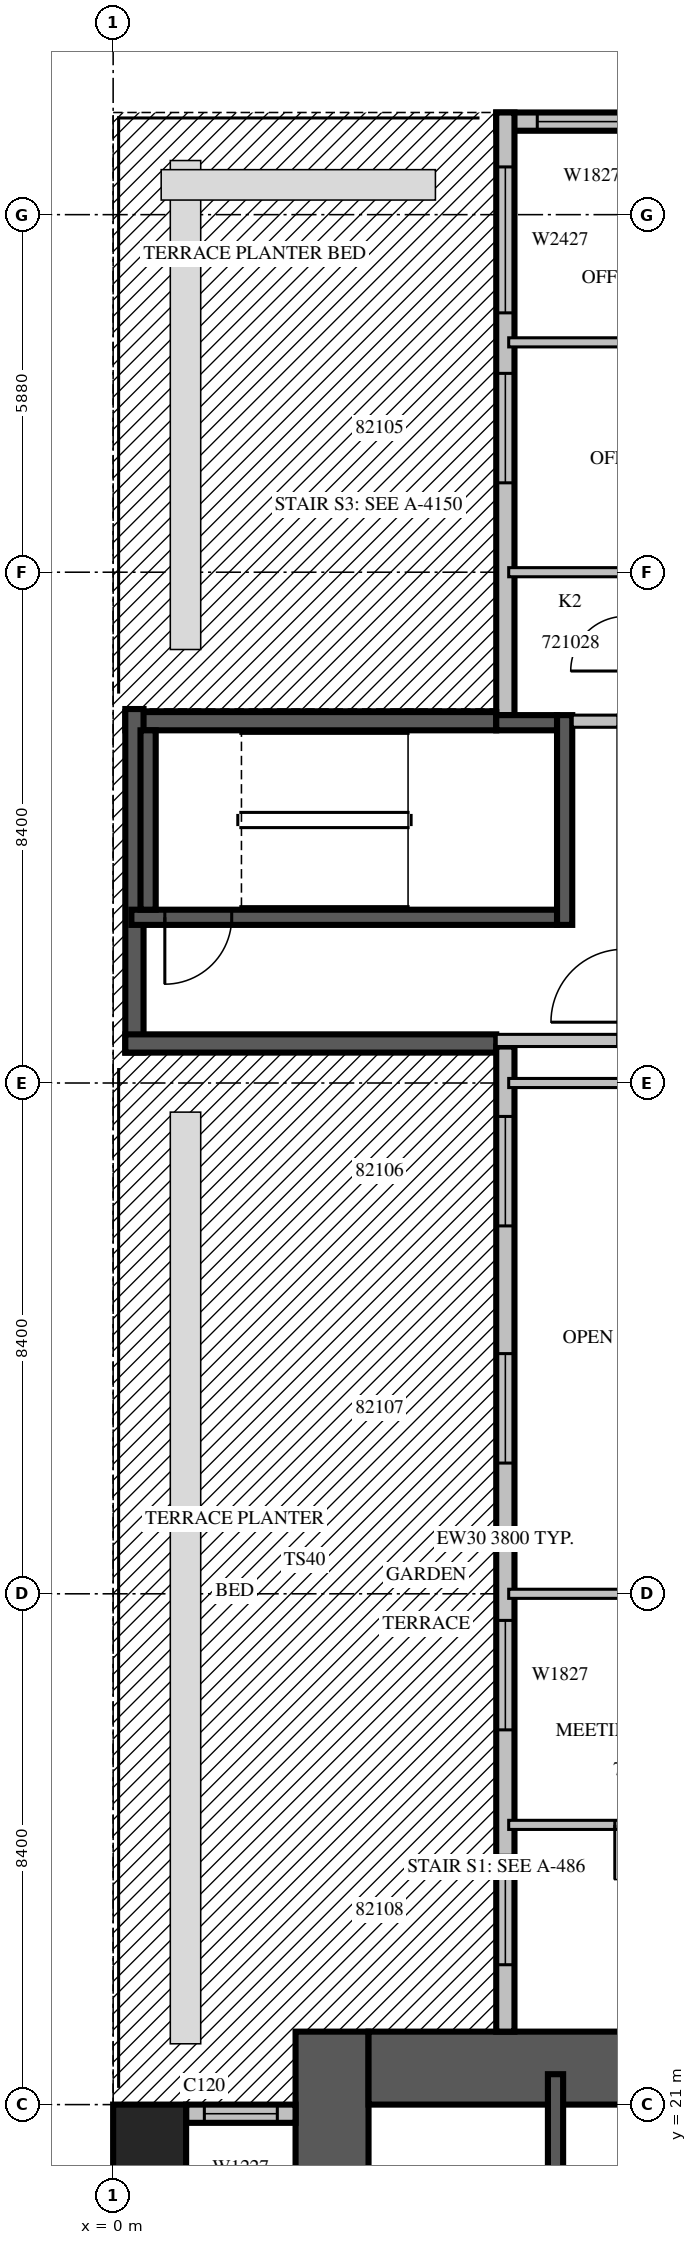
"""IFC4 building model, lengths in metres.
Left out: names, types, materials, properties, quantities, classifications, styles, units other than length and angle.
Written with IfcOpenShell. Run it as: python <this file> out.ifc"""

import sys

from ifc_helpers import new_model, si_unit, direction, frame, frame_2d, origin, origin_2d, place, context, subcontext, project, spatial, rectangle, extrude, source, transform, mapped, element, fill, save


model = new_model("IFC4")
c1 = context("Model", 3, precision=1e-05, world=origin(), true_north=direction((0.0, 1.0)))
c2 = subcontext(c1, "Body", "Model", "MODEL_VIEW")
j1 = project(units=[si_unit("LENGTHUNIT", "METRE"), si_unit("PLANEANGLEUNIT", "RADIAN")], contexts=[c1])
p1 = place(None, origin())
s1 = spatial("IfcSite", under=j1, at=p1, CompositionType="ELEMENT")
p2 = place(p1, origin())
s2 = spatial("IfcBuilding", under=s1, at=p2, CompositionType="ELEMENT")
p3 = place(p2, frame((0.0, 0.0, 99.3)))
s3 = spatial("IfcBuildingStorey", under=s2, at=p3, CompositionType="ELEMENT", Elevation=99.3)
m1 = source(origin(), c2, "Body", "SweptSolid", [
    extrude(rectangle(XDim=1.2, YDim=1.2, at=origin_2d()), origin(), (0.0, 0.0, 1.0), 4.2),
])
p4 = place(p3, frame((0.6, 20.4, 0.0), z_axis=(0.0, 0.0, 1.0), x_axis=(1.0, 0.0, 0.0)))
e1 = element("IfcColumn", 1, at=p4, inside=s3, PredefinedType="COLUMN", context=c2, shape_type="MappedRepresentation", body=[
    mapped(m1, transform((0.0, 0.0, 0.0), scale=1.0)),
])
m2 = source(origin(), c2, "Body", "SweptSolid", [
    extrude(rectangle(XDim=18.0, YDim=1.2, at=frame_2d((9.0, 0.0))), origin(), (0.0, 0.0, 1.0), 4.2),
])
p5 = place(p3, frame((3.6, 4.2, 0.0), z_axis=(0.0, 0.0, 1.0), x_axis=(0.0, 1.0, 0.0)))
e2 = element("IfcWall", 2, at=p5, inside=s3, PredefinedType="SHEAR", context=c2, shape_type="MappedRepresentation", body=[
    mapped(m2, transform((0.0, 0.0, 0.0), scale=1.0)),
])
m3 = source(origin(), c2, "Body", "SweptSolid", [
    extrude(rectangle(XDim=2.2, YDim=2.1, at=frame_2d((1.1, 1.05))), frame((0.0, 0.61, 0.0), z_axis=(0.0, -1.0, 0.0), x_axis=(1.0, 0.0, 0.0)), (0.0, 0.0, 1.0), 1.22),
])
p6 = place(p5, frame((4.2, 0.0, 0.0)))
e3 = element("IfcOpeningElement", 3, at=p6, cuts=e2, PredefinedType="OPENING", context=c2, shape_type="MappedRepresentation", body=[
    mapped(m3, transform((0.0, 0.0, 0.0), scale=1.0)),
])
p7 = place(p5, frame((10.95, 0.0, 0.0)))
e4 = element("IfcOpeningElement", 4, at=p7, cuts=e2, PredefinedType="OPENING", context=c2, shape_type="SweptSolid", body=[
    extrude(rectangle(XDim=0.9, YDim=2.1, at=frame_2d((0.45, 1.05))), frame((0.0, 0.61, 0.0), z_axis=(0.0, -1.0, 0.0), x_axis=(1.0, 0.0, 0.0)), (0.0, 0.0, 1.0), 1.22),
])
m4 = source(origin(), c2, "Body", "SweptSolid", [
    extrude(rectangle(XDim=16.8, YDim=1.2, at=frame_2d((8.4, 0.0))), origin(), (0.0, 0.0, 1.0), 4.2),
])
p8 = place(p3, frame((4.2, 21.6, 0.0), z_axis=(0.0, 0.0, 1.0), x_axis=(1.0, 0.0, 0.0)))
e5 = element("IfcWall", 5, at=p8, inside=s3, PredefinedType="SHEAR", context=c2, shape_type="MappedRepresentation", body=[
    mapped(m4, transform((0.0, 0.0, 0.0), scale=1.0)),
])
m5 = source(origin(), c2, "Body", "SweptSolid", [
    extrude(rectangle(XDim=1.2, YDim=2.1, at=frame_2d((0.6, 1.05))), frame((0.0, 0.61, 0.0), z_axis=(0.0, -1.0, 0.0), x_axis=(1.0, 0.0, 0.0)), (0.0, 0.0, 1.0), 1.22),
])
p9 = place(p8, frame((6.2, 0.0, 0.0)))
e6 = element("IfcOpeningElement", 6, at=p9, cuts=e5, PredefinedType="OPENING", context=c2, shape_type="MappedRepresentation", body=[
    mapped(m5, transform((0.0, 0.0, 0.0), scale=1.0)),
])
p10 = place(p3, frame((16.8, 53.61, 0.0), z_axis=(0.0, 0.0, 1.0), x_axis=(-1.0, 0.0, 0.0)))
e7 = element("IfcWall", 7, at=p10, inside=s3, PredefinedType="STANDARD", context=c2, shape_type="SweptSolid", body=[
    extrude(rectangle(XDim=10.5, YDim=0.3, at=frame_2d((5.25, 0.0))), origin(), (0.0, 0.0, 1.0), 3.8),
])
m6 = source(origin(), c2, "Body", "SweptSolid", [
    extrude(rectangle(XDim=1.8, YDim=2.4, at=frame_2d((0.9, 1.2))), frame((0.0, 0.16, 0.0), z_axis=(0.0, -1.0, 0.0), x_axis=(1.0, 0.0, 0.0)), (0.0, 0.0, 1.0), 0.32),
])
p11 = place(p10, frame((1.95, 0.0, 0.0)))
e8 = element("IfcOpeningElement", 8, at=p11, cuts=e7, PredefinedType="OPENING", context=c2, shape_type="MappedRepresentation", body=[
    mapped(m6, transform((0.0, 0.0, 0.0), scale=1.0)),
])
m7 = source(origin(), c2, "Body", "SweptSolid", [
    extrude(rectangle(XDim=1.8, YDim=2.7, at=frame_2d((0.9, 1.35))), frame((0.0, 0.16, 0.0), z_axis=(0.0, -1.0, 0.0), x_axis=(1.0, 0.0, 0.0)), (0.0, 0.0, 1.0), 0.32),
])
p12 = place(p10, frame((8.025, 0.0, 0.6)))
e9 = element("IfcOpeningElement", 9, at=p12, cuts=e7, PredefinedType="OPENING", context=c2, shape_type="MappedRepresentation", body=[
    mapped(m7, transform((0.0, 0.0, 0.0), scale=1.0)),
])
p13 = place(p3, frame((6.45, 53.76, 0.0), z_axis=(0.0, 0.0, 1.0), x_axis=(0.0, -1.0, 0.0)))
e10 = element("IfcWall", 10, at=p13, inside=s3, PredefinedType="STANDARD", context=c2, shape_type="SweptSolid", body=[
    extrude(rectangle(XDim=9.91, YDim=0.3, at=frame_2d((4.955, 0.0))), origin(), (0.0, 0.0, 1.0), 3.8),
])
p14 = place(p13, frame((4.29, 0.0, 0.0)))
e11 = element("IfcOpeningElement", 11, at=p14, cuts=e10, PredefinedType="OPENING", context=c2, shape_type="MappedRepresentation", body=[
    mapped(m6, transform((0.0, 0.0, 0.0), scale=1.0)),
])
m8 = source(origin(), c2, "Body", "SweptSolid", [
    extrude(rectangle(XDim=2.4, YDim=2.7, at=frame_2d((1.2, 1.35))), frame((0.0, 0.16, 0.0), z_axis=(0.0, -1.0, 0.0), x_axis=(1.0, 0.0, 0.0)), (0.0, 0.0, 1.0), 0.32),
])
p15 = place(p13, frame((0.895, 0.0, 0.6)))
e12 = element("IfcOpeningElement", 12, at=p15, cuts=e10, PredefinedType="OPENING", context=c2, shape_type="MappedRepresentation", body=[
    mapped(m8, transform((0.0, 0.0, 0.0), scale=1.0)),
])
p16 = place(p3, frame((6.3, 43.75, 0.0), z_axis=(0.0, 0.0, 1.0), x_axis=(-1.0, 0.0, 0.0)))
e13 = element("IfcWall", 13, at=p16, inside=s3, PredefinedType="SOLIDWALL", context=c2, shape_type="SweptSolid", body=[
    extrude(rectangle(XDim=6.1, YDim=0.3, at=frame_2d((3.05, 0.0))), origin(), (0.0, 0.0, 1.0), 3.8),
])
p17 = place(p3, frame((0.35, 43.95, 0.0), z_axis=(0.0, 0.0, 1.0), x_axis=(0.0, -1.0, 0.0)))
e14 = element("IfcWall", 14, at=p17, inside=s3, PredefinedType="SOLIDWALL", context=c2, shape_type="SweptSolid", body=[
    extrude(rectangle(XDim=5.65, YDim=0.3, at=frame_2d((2.825, 0.0))), origin(), (0.0, 0.0, 1.0), 3.8),
])
m9 = source(origin(), c2, "Body", "SweptSolid", [
    extrude(rectangle(XDim=6.1, YDim=0.3, at=frame_2d((3.05, 0.0))), origin(), (0.0, 0.0, 1.0), 3.8),
])
p18 = place(p3, frame((0.2, 38.45, 0.0), z_axis=(0.0, 0.0, 1.0), x_axis=(1.0, 0.0, 0.0)))
e15 = element("IfcWall", 15, at=p18, inside=s3, PredefinedType="SOLIDWALL", context=c2, shape_type="MappedRepresentation", body=[
    mapped(m9, transform((0.0, 0.0, 0.0), scale=1.0)),
])
p19 = place(p3, frame((6.45, 38.4, 0.0), z_axis=(0.0, 0.0, 1.0), x_axis=(0.0, -1.0, 0.0)))
e16 = element("IfcWall", 16, at=p19, inside=s3, PredefinedType="STANDARD", context=c2, shape_type="SweptSolid", body=[
    extrude(rectangle(XDim=16.2, YDim=0.3, at=frame_2d((8.1, 0.0))), origin(), (0.0, 0.0, 1.0), 3.8),
])
p20 = place(p19, frame((1.15, 0.0, 0.0)))
e17 = element("IfcOpeningElement", 17, at=p20, cuts=e16, PredefinedType="OPENING", context=c2, shape_type="MappedRepresentation", body=[
    mapped(m6, transform((0.0, 0.0, 0.0), scale=1.0)),
])
p21 = place(p19, frame((5.05, 0.0, 0.0)))
e18 = element("IfcOpeningElement", 18, at=p21, cuts=e16, PredefinedType="OPENING", context=c2, shape_type="MappedRepresentation", body=[
    mapped(m6, transform((0.0, 0.0, 0.0), scale=1.0)),
])
p22 = place(p19, frame((9.438, 0.0, 0.6)))
e19 = element("IfcOpeningElement", 19, at=p22, cuts=e16, PredefinedType="OPENING", context=c2, shape_type="MappedRepresentation", body=[
    mapped(m7, transform((0.0, 0.0, 0.0), scale=1.0)),
])
p23 = place(p19, frame((13.3, 0.0, 0.0)))
e20 = element("IfcOpeningElement", 20, at=p23, cuts=e16, PredefinedType="OPENING", context=c2, shape_type="MappedRepresentation", body=[
    mapped(m6, transform((0.0, 0.0, 0.0), scale=1.0)),
])
m10 = source(origin(), c2, "Body", "SweptSolid", [
    extrude(rectangle(XDim=1.8, YDim=0.3, at=frame_2d((0.9, 0.0))), origin(), (0.0, 0.0, 1.0), 3.8),
])
p24 = place(p3, frame((3.0, 20.85, 0.0), z_axis=(0.0, 0.0, 1.0), x_axis=(-1.0, 0.0, 0.0)))
e21 = element("IfcWall", 21, at=p24, inside=s3, PredefinedType="STANDARD", context=c2, shape_type="MappedRepresentation", body=[
    mapped(m10, transform((0.0, 0.0, 0.0), scale=1.0)),
])
m11 = source(origin(), c2, "Body", "SweptSolid", [
    extrude(rectangle(XDim=1.2, YDim=2.7, at=frame_2d((0.6, 1.35))), frame((0.0, 0.16, 0.0), z_axis=(0.0, -1.0, 0.0), x_axis=(1.0, 0.0, 0.0)), (0.0, 0.0, 1.0), 0.32),
])
p25 = place(p24, frame((0.3, 0.0, 0.6)))
e22 = element("IfcOpeningElement", 22, at=p25, cuts=e21, PredefinedType="OPENING", context=c2, shape_type="MappedRepresentation", body=[
    mapped(m11, transform((0.0, 0.0, 0.0), scale=1.0)),
])
m12 = source(origin(), c2, "Body", "SweptSolid", [
    extrude(rectangle(XDim=6.6, YDim=0.25, at=frame_2d((3.3, 0.0))), origin(), (0.0, 0.0, 1.0), 3.8),
])
p26 = place(p3, frame((7.275, 14.9, 0.0), z_axis=(0.0, 0.0, 1.0), x_axis=(0.0, 1.0, 0.0)))
e23 = element("IfcWall", 23, at=p26, inside=s3, PredefinedType="SOLIDWALL", context=c2, shape_type="MappedRepresentation", body=[
    mapped(m12, transform((0.0, 0.0, 0.0), scale=1.0)),
])
m13 = source(origin(), c2, "Body", "SweptSolid", [
    extrude(rectangle(XDim=1.1, YDim=2.1, at=frame_2d((0.55, 1.05))), frame((0.0, 0.135, 0.0), z_axis=(0.0, -1.0, 0.0), x_axis=(1.0, 0.0, 0.0)), (0.0, 0.0, 1.0), 0.27),
])
p27 = place(p26, frame((0.15, 0.0, 0.0)))
e24 = element("IfcOpeningElement", 24, at=p27, cuts=e23, PredefinedType="OPENING", context=c2, shape_type="MappedRepresentation", body=[
    mapped(m13, transform((0.0, 0.0, 0.0), scale=1.0)),
])
m14 = source(origin(), c2, "Body", "SweptSolid", [
    extrude(rectangle(XDim=7.0, YDim=0.25, at=frame_2d((3.5, 0.0))), origin(), (0.0, 0.0, 1.0), 3.8),
])
p28 = place(p3, frame((0.3, 40.525, 0.0), z_axis=(0.0, 0.0, 1.0), x_axis=(1.0, 0.0, 0.0)))
e25 = element("IfcWall", 25, at=p28, inside=s3, PredefinedType="SOLIDWALL", context=c2, shape_type="MappedRepresentation", body=[
    mapped(m14, transform((0.0, 0.0, 0.0), scale=1.0)),
])
p29 = place(p28, frame((0.55, 0.0, 0.0)))
e26 = element("IfcOpeningElement", 26, at=p29, cuts=e25, PredefinedType="OPENING", context=c2, shape_type="MappedRepresentation", body=[
    mapped(m13, transform((0.0, 0.0, 0.0), scale=1.0)),
])
p30 = place(p3, frame((6.3, 43.725, 0.0), z_axis=(0.0, 0.0, 1.0), x_axis=(1.0, 0.0, 0.0)))
e27 = element("IfcWall", 27, at=p30, inside=s3, PredefinedType="SOLIDWALL", context=c2, shape_type="SweptSolid", body=[
    extrude(rectangle(XDim=1.0, YDim=0.25, at=frame_2d((0.5, 0.0))), origin(), (0.0, 0.0, 1.0), 3.8),
])
m15 = source(origin(), c2, "Body", "SweptSolid", [
    extrude(rectangle(XDim=3.45, YDim=0.25, at=frame_2d((1.725, 0.0))), origin(), (0.0, 0.0, 1.0), 3.8),
])
p31 = place(p3, frame((7.425, 40.4, 0.0), z_axis=(0.0, 0.0, 1.0), x_axis=(0.0, 1.0, 0.0)))
e28 = element("IfcWall", 28, at=p31, inside=s3, PredefinedType="SOLIDWALL", context=c2, shape_type="MappedRepresentation", body=[
    mapped(m15, transform((0.0, 0.0, 0.0), scale=1.0)),
])
m16 = source(origin(), c2, "Body", "SweptSolid", [
    extrude(rectangle(XDim=2.95, YDim=0.25, at=frame_2d((1.475, 0.0))), origin(), (0.0, 0.0, 1.0), 3.8),
])
p32 = place(p3, frame((0.575, 40.65, 0.0), z_axis=(0.0, 0.0, 1.0), x_axis=(0.0, 1.0, 0.0)))
e29 = element("IfcWall", 29, at=p32, inside=s3, PredefinedType="SOLIDWALL", context=c2, shape_type="MappedRepresentation", body=[
    mapped(m16, transform((0.0, 0.0, 0.0), scale=1.0)),
])
p33 = place(p3, frame((6.3, 38.5, 0.0), z_axis=(0.0, 0.0, 1.0), x_axis=(1.0, 0.0, 0.0)))
e30 = element("IfcWall", 30, at=p33, inside=s3, PredefinedType="PARTITIONING", context=c2, shape_type="SweptSolid", body=[
    extrude(rectangle(XDim=2.0, YDim=0.2, at=frame_2d((1.0, 0.0))), origin(), (0.0, 0.0, 1.0), 3.8),
])
m17 = source(origin(), c2, "Body", "SweptSolid", [
    extrude(rectangle(XDim=0.75, YDim=0.2, at=frame_2d((0.375, 0.0))), origin(), (0.0, 0.0, 1.0), 3.8),
])
p34 = place(p3, frame((7.55, 43.75, 0.0), z_axis=(0.0, 0.0, 1.0), x_axis=(1.0, 0.0, 0.0)))
e31 = element("IfcWall", 31, at=p34, inside=s3, PredefinedType="PARTITIONING", context=c2, shape_type="MappedRepresentation", body=[
    mapped(m17, transform((0.0, 0.0, 0.0), scale=1.0)),
])
p35 = place(p3, frame((6.505, 25.6, 0.0), z_axis=(0.0, 0.0, 1.0), x_axis=(1.0, 0.0, 0.0)))
e32 = element("IfcWall", 32, at=p35, inside=s3, PredefinedType="PARTITIONING", context=c2, shape_type="SweptSolid", body=[
    extrude(rectangle(XDim=8.495, YDim=0.15, at=frame_2d((4.247, 0.0))), origin(), (0.0, 0.0, 1.0), 3.8),
])
m18 = source(origin(), c2, "Body", "SweptSolid", [
    extrude(rectangle(XDim=0.9, YDim=2.1, at=frame_2d((0.45, 1.05))), frame((0.0, 0.085, 0.0), z_axis=(0.0, -1.0, 0.0), x_axis=(1.0, 0.0, 0.0)), (0.0, 0.0, 1.0), 0.17),
])
p36 = place(p35, frame((1.745, 0.0, 0.0)))
e33 = element("IfcOpeningElement", 33, at=p36, cuts=e32, PredefinedType="OPENING", context=c2, shape_type="MappedRepresentation", body=[
    mapped(m18, transform((0.0, 0.0, 0.0), scale=1.0)),
])
p37 = place(p35, frame((6.82, 0.0, 0.0)))
e34 = element("IfcOpeningElement", 34, at=p37, cuts=e32, PredefinedType="OPENING", context=c2, shape_type="MappedRepresentation", body=[
    mapped(m18, transform((0.0, 0.0, 0.0), scale=1.0)),
])
p38 = place(p3, frame((9.901, 29.4, 0.0), z_axis=(0.0, 0.0, 1.0), x_axis=(-1.0, 0.0, 0.0)))
e35 = element("IfcWall", 35, at=p38, inside=s3, PredefinedType="PARTITIONING", context=c2, shape_type="SweptSolid", body=[
    extrude(rectangle(XDim=3.396, YDim=0.15, at=frame_2d((1.698, 0.0))), origin(), (0.0, 0.0, 1.0), 3.8),
])
m19 = source(origin(), c2, "Body", "SweptSolid", [
    extrude(rectangle(XDim=3.396, YDim=0.15, at=frame_2d((1.698, 0.0))), origin(), (0.0, 0.0, 1.0), 3.8),
])
p39 = place(p3, frame((9.901, 37.8, 0.0), z_axis=(0.0, 0.0, 1.0), x_axis=(-1.0, 0.0, 0.0)))
e36 = element("IfcWall", 36, at=p39, inside=s3, PredefinedType="PARTITIONING", context=c2, shape_type="MappedRepresentation", body=[
    mapped(m19, transform((0.0, 0.0, 0.0), scale=1.0)),
])
p40 = place(p3, frame((11.1, 49.98, 0.0), z_axis=(0.0, 0.0, 1.0), x_axis=(-1.0, 0.0, 0.0)))
e37 = element("IfcWall", 37, at=p40, inside=s3, PredefinedType="PARTITIONING", context=c2, shape_type="SweptSolid", body=[
    extrude(rectangle(XDim=4.595, YDim=0.15, at=frame_2d((2.297, 0.0))), origin(), (0.0, 0.0, 1.0), 3.8),
])
p41 = place(p3, frame((9.901, 46.2, 0.0), z_axis=(0.0, 0.0, 1.0), x_axis=(-1.0, 0.0, 0.0)))
e38 = element("IfcWall", 38, at=p41, inside=s3, PredefinedType="PARTITIONING", context=c2, shape_type="MappedRepresentation", body=[
    mapped(m19, transform((0.0, 0.0, 0.0), scale=1.0)),
])
m20 = source(origin(), c2, "Body", "SweptSolid", [
    extrude(rectangle(XDim=1.8, YDim=2.7, at=frame_2d((0.9, 1.35))), frame((0.0, 0.03, 0.0), z_axis=(0.0, -1.0, 0.0), x_axis=(1.0, 0.0, 0.0)), (0.0, 0.0, 1.0), 0.06),
])
p42 = place(p12, origin())
e39 = element("IfcWindow", 39, at=p42, inside=s3, PartitioningType="SINGLE_PANEL", PredefinedType="WINDOW", context=c2, shape_type="MappedRepresentation", body=[
    mapped(m20, transform((0.0, 0.0, 0.0), scale=1.0)),
])
fill(e9, e39)
m21 = source(origin(), c2, "Body", "SweptSolid", [
    extrude(rectangle(XDim=1.8, YDim=2.4, at=frame_2d((0.9, 1.2))), frame((0.0, 0.025, 0.0), z_axis=(0.0, -1.0, 0.0), x_axis=(1.0, 0.0, 0.0)), (0.0, 0.0, 1.0), 0.05),
])
p43 = place(p14, origin())
e40 = element("IfcDoor", 40, at=p43, inside=s3, OperationType="SLIDING_TO_LEFT", PredefinedType="DOOR", context=c2, shape_type="MappedRepresentation", body=[
    mapped(m21, transform((0.0, 0.0, 0.0), scale=1.0)),
])
fill(e11, e40)
m22 = source(origin(), c2, "Body", "SweptSolid", [
    extrude(rectangle(XDim=2.4, YDim=2.7, at=frame_2d((1.2, 1.35))), frame((0.0, 0.03, 0.0), z_axis=(0.0, -1.0, 0.0), x_axis=(1.0, 0.0, 0.0)), (0.0, 0.0, 1.0), 0.06),
])
p44 = place(p15, origin())
e41 = element("IfcWindow", 41, at=p44, inside=s3, PartitioningType="SINGLE_PANEL", PredefinedType="WINDOW", context=c2, shape_type="MappedRepresentation", body=[
    mapped(m22, transform((0.0, 0.0, 0.0), scale=1.0)),
])
fill(e12, e41)
p45 = place(p20, origin())
e42 = element("IfcDoor", 42, at=p45, inside=s3, OperationType="SLIDING_TO_LEFT", PredefinedType="DOOR", context=c2, shape_type="MappedRepresentation", body=[
    mapped(m21, transform((0.0, 0.0, 0.0), scale=1.0)),
])
fill(e17, e42)
p46 = place(p21, origin())
e43 = element("IfcDoor", 43, at=p46, inside=s3, OperationType="SLIDING_TO_LEFT", PredefinedType="DOOR", context=c2, shape_type="MappedRepresentation", body=[
    mapped(m21, transform((0.0, 0.0, 0.0), scale=1.0)),
])
fill(e18, e43)
p47 = place(p22, origin())
e44 = element("IfcWindow", 44, at=p47, inside=s3, PartitioningType="SINGLE_PANEL", PredefinedType="WINDOW", context=c2, shape_type="MappedRepresentation", body=[
    mapped(m20, transform((0.0, 0.0, 0.0), scale=1.0)),
])
fill(e19, e44)
p48 = place(p23, origin())
e45 = element("IfcDoor", 45, at=p48, inside=s3, OperationType="SLIDING_TO_LEFT", PredefinedType="DOOR", context=c2, shape_type="MappedRepresentation", body=[
    mapped(m21, transform((0.0, 0.0, 0.0), scale=1.0)),
])
fill(e20, e45)
m23 = source(origin(), c2, "Body", "SweptSolid", [
    extrude(rectangle(XDim=1.2, YDim=2.7, at=frame_2d((0.6, 1.35))), frame((0.0, 0.03, 0.0), z_axis=(0.0, -1.0, 0.0), x_axis=(1.0, 0.0, 0.0)), (0.0, 0.0, 1.0), 0.06),
])
p49 = place(p25, origin())
e46 = element("IfcWindow", 46, at=p49, inside=s3, PartitioningType="SINGLE_PANEL", PredefinedType="WINDOW", context=c2, shape_type="MappedRepresentation", body=[
    mapped(m23, transform((0.0, 0.0, 0.0), scale=1.0)),
])
fill(e22, e46)
m24 = source(origin(), c2, "Body", "SweptSolid", [
    extrude(rectangle(XDim=1.1, YDim=2.1, at=frame_2d((0.55, 1.05))), frame((0.0, 0.025, 0.0), z_axis=(0.0, -1.0, 0.0), x_axis=(1.0, 0.0, 0.0)), (0.0, 0.0, 1.0), 0.05),
])
p50 = place(p29, origin())
e47 = element("IfcDoor", 47, at=p50, inside=s3, OperationType="SINGLE_SWING_RIGHT", PredefinedType="DOOR", context=c2, shape_type="MappedRepresentation", body=[
    mapped(m24, transform((0.0, 0.0, 0.0), scale=1.0)),
])
fill(e26, e47)
m25 = source(origin(), c2, "Body", "SweptSolid", [
    extrude(rectangle(XDim=0.9, YDim=2.1, at=frame_2d((0.45, 1.05))), frame((0.0, 0.025, 0.0), z_axis=(0.0, -1.0, 0.0), x_axis=(1.0, 0.0, 0.0)), (0.0, 0.0, 1.0), 0.05),
])
p51 = place(p36, origin())
e48 = element("IfcDoor", 48, at=p51, inside=s3, OperationType="SINGLE_SWING_RIGHT", PredefinedType="DOOR", context=c2, shape_type="MappedRepresentation", body=[
    mapped(m25, transform((0.0, 0.0, 0.0), scale=1.0)),
])
fill(e33, e48)
save(model, sys.argv[1])
